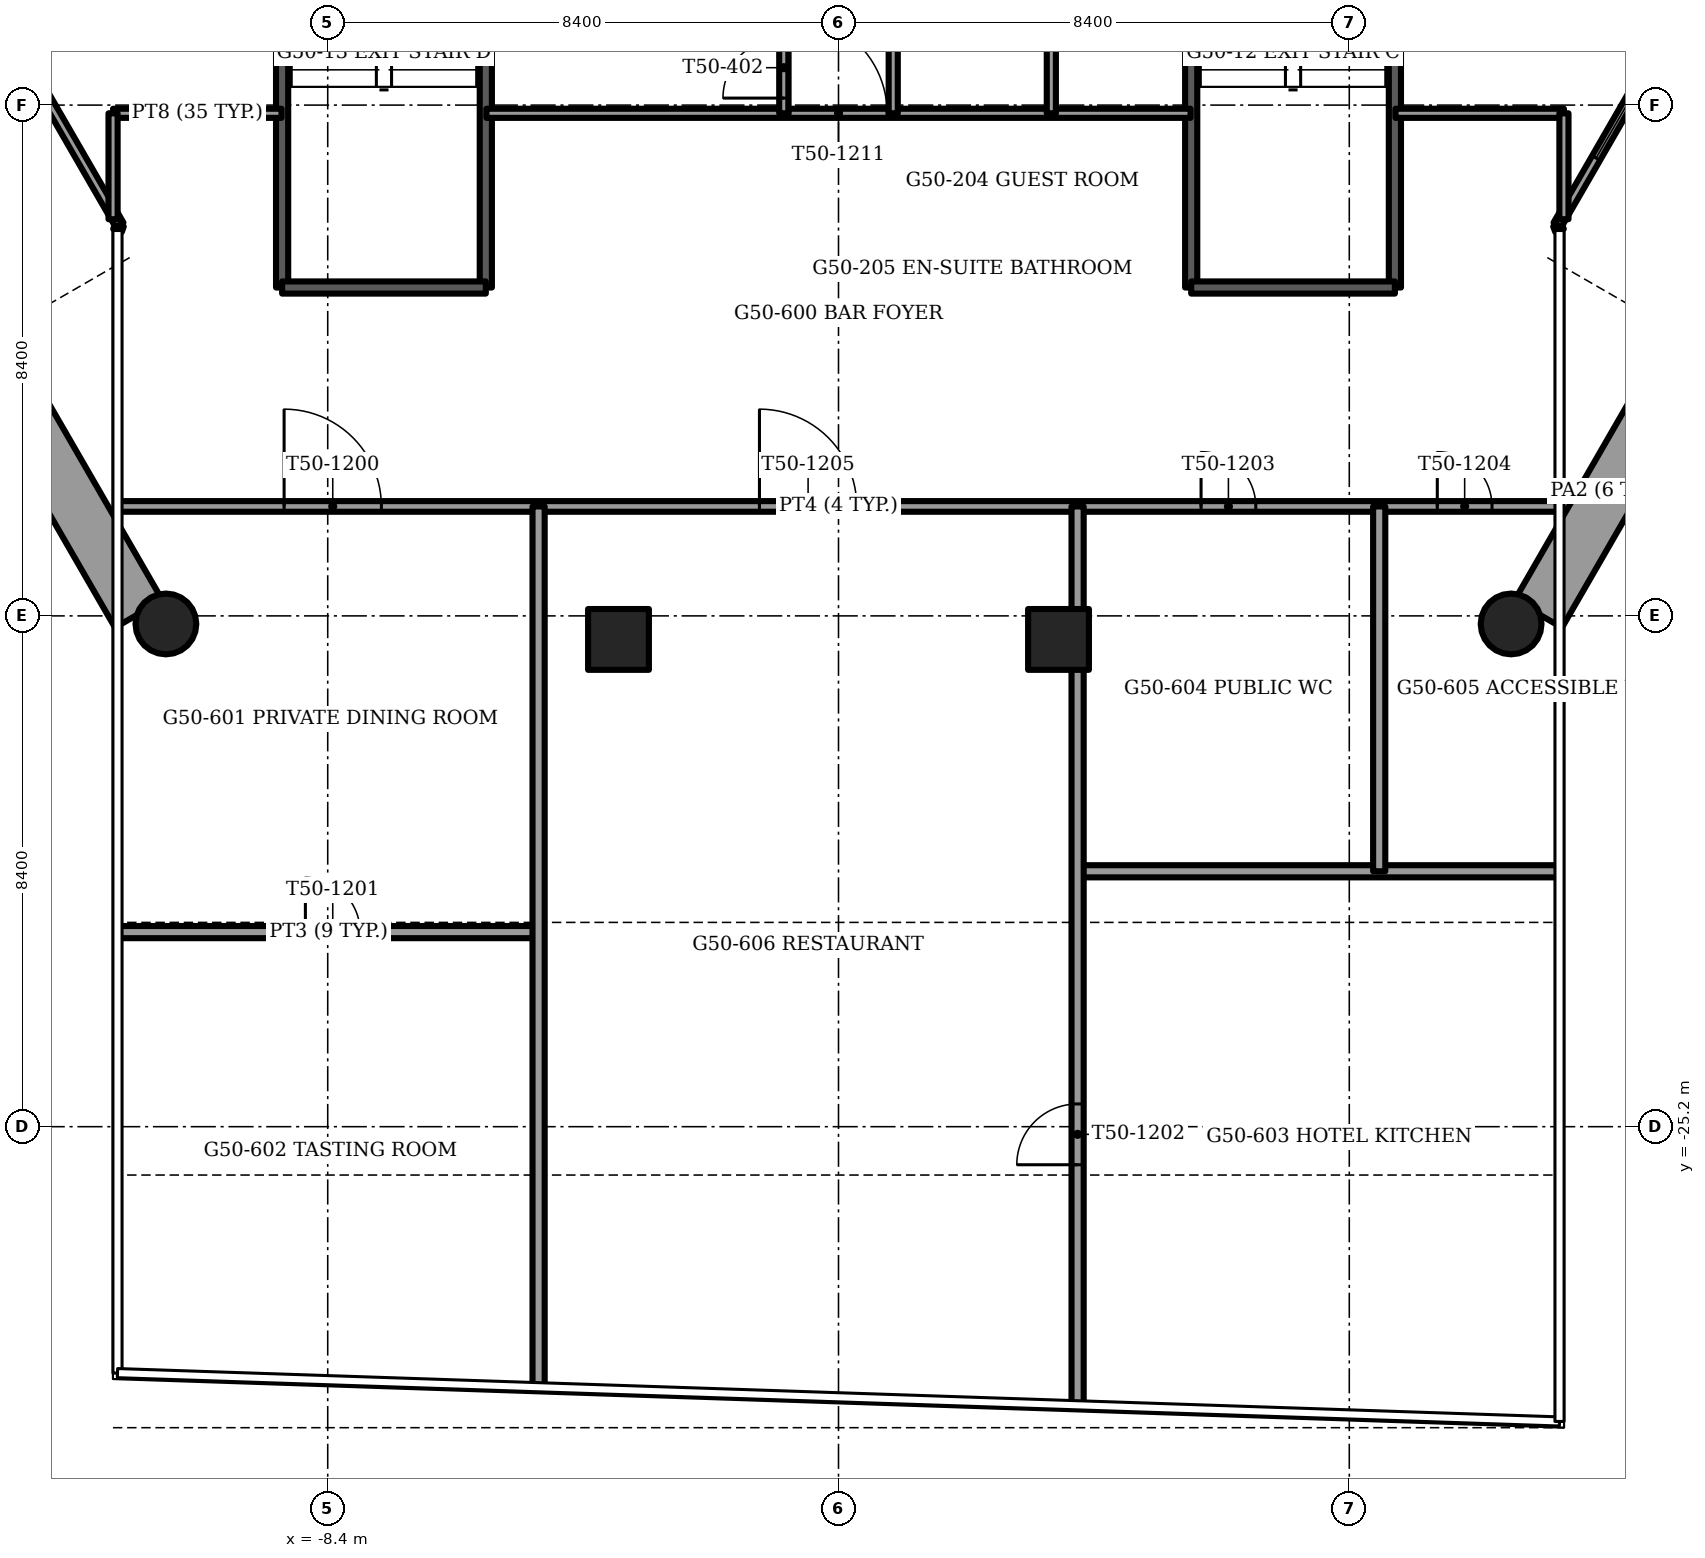
"""IFC4 building model, lengths in metres.
Left out: names, types, materials, properties, quantities, classifications, styles, units other than length and angle.
Written with IfcOpenShell. Run it as: python <this file> out.ifc"""

import sys

from ifc_helpers import new_model, si_unit, direction, frame, frame_2d, origin, origin_2d, place, context, subcontext, project, spatial, rectangle, circle, extrude, element, fill, save


model = new_model("IFC4")
c1 = context("Model", 3, precision=1e-05, world=origin(), true_north=direction((0.0, 1.0)))
c2 = subcontext(c1, "Body", "Model", "MODEL_VIEW")
j1 = project(units=[si_unit("LENGTHUNIT", "METRE"), si_unit("PLANEANGLEUNIT", "RADIAN")], contexts=[c1])
p1 = place(None, origin())
s1 = spatial("IfcSite", under=j1, at=p1, CompositionType="ELEMENT")
p2 = place(p1, origin())
s2 = spatial("IfcBuilding", under=s1, at=p2, CompositionType="ELEMENT")
p3 = place(p2, frame((0.0, 0.0, 202.0)))
s3 = spatial("IfcBuildingStorey", under=s2, at=p3, CompositionType="ELEMENT", Elevation=202.0)
for number, where, z_axis, x_axis in (
    (1, (-11.061, -16.933, -1.2), (0.0, 0.0, 1.0), (1.0, 0.0, 0.0)),
    (2, (11.061, -16.933, -1.2), (0.0, 0.0, 1.0), (1.0, 0.0, 0.0)),
):
    element("IfcColumn", number, at=place(p3, frame(where, z_axis=z_axis, x_axis=x_axis)), inside=s3, PredefinedType="COLUMN", context=c2, shape_type="SweptSolid", body=[
        extrude(circle(Radius=0.5, at=origin_2d()), origin(), (0.0, 0.0, 1.0), 3.75),
    ])
for number, where, z_axis, x_axis in (
    (3, (-3.618, -17.187, -1.2), (0.0, 0.0, 1.0), (-1.0, 0.0, 0.0)),
    (4, (3.618, -17.187, -1.2), (0.0, 0.0, 1.0), (-1.0, 0.0, 0.0)),
):
    element("IfcColumn", number, at=place(p3, frame(where, z_axis=z_axis, x_axis=x_axis)), inside=s3, PredefinedType="COLUMN", context=c2, shape_type="SweptSolid", body=[
        extrude(rectangle(XDim=1.0, YDim=1.0, at=origin_2d()), origin(), (0.0, 0.0, 1.0), 3.75),
    ])
for number, where, z_axis, x_axis in (
    (5, (-13.847, -12.715, 0.0), (0.0, 0.0, 1.0), (0.5, -0.866, 0.0)),
    (6, (11.508, -16.768, 0.0), (0.0, 0.0, 1.0), (0.5, 0.866, 0.0)),
):
    element("IfcWall", number, at=place(p3, frame(where, z_axis=z_axis, x_axis=x_axis)), inside=s3, PredefinedType="PARAPET", context=c2, shape_type="SweptSolid", body=[
        extrude(rectangle(XDim=4.679, YDim=0.9, at=frame_2d((2.339, 0.0))), origin(), (0.0, 0.0, 1.0), 1.1),
    ])
p4 = place(p3, frame((-16.861, -1.645, 0.0), z_axis=(0.0, 0.0, 1.0), x_axis=(0.499993749393, -0.866029012544, 0.0)))
e7 = element("IfcWall", 7, at=p4, inside=s3, PredefinedType="SOLIDWALL", context=c2, shape_type="SweptSolid", body=[
    extrude(rectangle(XDim=10.075, YDim=0.15, at=frame_2d((5.038, 0.0))), origin(), (0.0, 0.0, 1.0), 3.45),
])
p5 = place(p4, frame((1.006, 0.0, 0.15)))
e8 = element("IfcOpeningElement", 8, at=p5, cuts=e7, PredefinedType="OPENING", context=c2, shape_type="SweptSolid", body=[
    extrude(rectangle(XDim=0.9, YDim=2.2, at=frame_2d((0.45, 1.1))), frame((0.0, 0.075, 0.0), z_axis=(0.0, -1.0, 0.0), x_axis=(1.0, 0.0, 0.0)), (0.0, 0.0, 1.0), 0.15),
])
p6 = place(p4, frame((3.206, 0.0, 0.15)))
e9 = element("IfcOpeningElement", 9, at=p6, cuts=e7, PredefinedType="OPENING", context=c2, shape_type="SweptSolid", body=[
    extrude(rectangle(XDim=1.4, YDim=2.2, at=frame_2d((0.7, 1.1))), frame((0.0, 0.075, 0.0), z_axis=(0.0, -1.0, 0.0), x_axis=(1.0, 0.0, 0.0)), (0.0, 0.0, 1.0), 0.15),
])
p7 = place(p4, frame((5.699, 0.0, 0.15)))
e10 = element("IfcOpeningElement", 10, at=p7, cuts=e7, PredefinedType="OPENING", context=c2, shape_type="SweptSolid", body=[
    extrude(rectangle(XDim=1.6, YDim=2.2, at=frame_2d((0.8, 1.1))), frame((0.0, 0.075, 0.0), z_axis=(0.0, -1.0, 0.0), x_axis=(1.0, 0.0, 0.0)), (0.0, 0.0, 1.0), 0.15),
])
p8 = place(p3, frame((11.824, -10.37, 0.0), z_axis=(0.0, 0.0, 1.0), x_axis=(0.499993749393, 0.866029012544, 0.0)))
e11 = element("IfcWall", 11, at=p8, inside=s3, PredefinedType="SOLIDWALL", context=c2, shape_type="SweptSolid", body=[
    extrude(rectangle(XDim=10.075, YDim=0.15, at=frame_2d((5.038, 0.0))), origin(), (0.0, 0.0, 1.0), 3.45),
])
p9 = place(p8, frame((1.269, 0.0, 0.15)))
e12 = element("IfcOpeningElement", 12, at=p9, cuts=e11, PredefinedType="OPENING", context=c2, shape_type="SweptSolid", body=[
    extrude(rectangle(XDim=1.6, YDim=2.2, at=frame_2d((0.8, 1.1))), frame((0.0, 0.075, 0.0), z_axis=(0.0, -1.0, 0.0), x_axis=(1.0, 0.0, 0.0)), (0.0, 0.0, 1.0), 0.15),
])
p10 = place(p8, frame((5.469, 0.0, 0.15)))
e13 = element("IfcOpeningElement", 13, at=p10, cuts=e11, PredefinedType="OPENING", context=c2, shape_type="SweptSolid", body=[
    extrude(rectangle(XDim=1.6, YDim=2.2, at=frame_2d((0.8, 1.1))), frame((0.0, 0.075, 0.0), z_axis=(0.0, -1.0, 0.0), x_axis=(1.0, 0.0, 0.0)), (0.0, 0.0, 1.0), 0.15),
])
for number, where, z_axis, x_axis in (
    (14, (-11.824, -10.37, 0.0), (0.0, 0.0, 1.0), (-0.339, -0.941, 0.0)),
    (15, (11.824, -10.37, 0.0), (0.0, 0.0, 1.0), (0.339, -0.941, 0.0)),
):
    element("IfcWall", number, at=place(p3, frame(where, z_axis=z_axis, x_axis=x_axis)), inside=s3, PredefinedType="SOLIDWALL", context=c2, shape_type="SweptSolid", body=[
        extrude(rectangle(XDim=0.098, YDim=0.15, at=frame_2d((0.049, 0.0))), origin(), (0.0, 0.0, 1.0), 3.45),
    ])
for number, where, z_axis, x_axis in (
    (16, (5.8, -3.7, -0.3), (0.0, 0.0, 1.0), (0.0, -1.0, 0.0)),
    (17, (9.15, -3.7, -0.3), (0.0, 0.0, 1.0), (0.0, -1.0, 0.0)),
):
    element("IfcWall", number, at=place(p3, frame(where, z_axis=z_axis, x_axis=x_axis)), inside=s3, PredefinedType="SOLIDWALL", context=c2, shape_type="SweptSolid", body=[
        extrude(rectangle(XDim=7.7, YDim=0.2, at=frame_2d((3.85, 0.0))), origin(), (0.0, 0.0, 1.0), 3.75),
    ])
p11 = place(p3, frame((5.8, -11.4, -0.3), z_axis=(0.0, 0.0, 1.0), x_axis=(1.0, 0.0, 0.0)))
e18 = element("IfcWall", 18, at=p11, inside=s3, PredefinedType="SOLIDWALL", context=c2, shape_type="SweptSolid", body=[
    extrude(rectangle(XDim=3.35, YDim=0.2, at=frame_2d((1.675, 0.0))), origin(), (0.0, 0.0, 1.0), 3.75),
])
for number, where, z_axis, x_axis in (
    (19, (-9.15, -3.7, -0.3), (0.0, 0.0, 1.0), (0.0, -1.0, 0.0)),
    (20, (-5.8, -3.7, -0.3), (0.0, 0.0, 1.0), (0.0, -1.0, 0.0)),
):
    element("IfcWall", number, at=place(p3, frame(where, z_axis=z_axis, x_axis=x_axis)), inside=s3, PredefinedType="SOLIDWALL", context=c2, shape_type="SweptSolid", body=[
        extrude(rectangle(XDim=7.7, YDim=0.2, at=frame_2d((3.85, 0.0))), origin(), (0.0, 0.0, 1.0), 3.75),
    ])
p12 = place(p3, frame((-9.15, -11.4, -0.3), z_axis=(0.0, 0.0, 1.0), x_axis=(1.0, 0.0, 0.0)))
e21 = element("IfcWall", 21, at=p12, inside=s3, PredefinedType="SOLIDWALL", context=c2, shape_type="SweptSolid", body=[
    extrude(rectangle(XDim=3.35, YDim=0.2, at=frame_2d((1.675, 0.0))), origin(), (0.0, 0.0, 1.0), 3.75),
])
p13 = place(p3, frame((-11.93, -8.535, 0.0), z_axis=(0.0, 0.0, 1.0), x_axis=(1.0, 0.0, 0.0)))
e22 = element("IfcWall", 22, at=p13, inside=s3, PredefinedType="PARTITIONING", context=c2, shape_type="SweptSolid", body=[
    extrude(rectangle(XDim=2.77, YDim=0.15, at=frame_2d((1.385, 0.0))), origin(), (0.0, 0.0, 1.0), 3.45),
])
p14 = place(p3, frame((-5.79, -8.535, 0.0), z_axis=(0.0, 0.0, 1.0), x_axis=(1.0, 0.0, 0.0)))
e23 = element("IfcWall", 23, at=p14, inside=s3, PredefinedType="PARTITIONING", context=c2, shape_type="SweptSolid", body=[
    extrude(rectangle(XDim=11.58, YDim=0.15, at=frame_2d((5.79, 0.0))), origin(), (0.0, 0.0, 1.0), 3.45),
])
p15 = place(p14, frame((4.99, 0.0, 0.0)))
e24 = element("IfcOpeningElement", 24, at=p15, cuts=e23, PredefinedType="OPENING", context=c2, shape_type="SweptSolid", body=[
    extrude(rectangle(XDim=1.6, YDim=2.1, at=frame_2d((0.8, 1.05))), frame((0.0, 0.075, 0.0), z_axis=(0.0, -1.0, 0.0), x_axis=(1.0, 0.0, 0.0)), (0.0, 0.0, 1.0), 0.15),
])
p16 = place(p3, frame((9.16, -8.535, 0.0), z_axis=(0.0, 0.0, 1.0), x_axis=(1.0, 0.0, 0.0)))
e25 = element("IfcWall", 25, at=p16, inside=s3, PredefinedType="PARTITIONING", context=c2, shape_type="SweptSolid", body=[
    extrude(rectangle(XDim=2.77, YDim=0.15, at=frame_2d((1.385, 0.0))), origin(), (0.0, 0.0, 1.0), 3.45),
])
p17 = place(p3, frame((11.93, -10.277, 0.0), z_axis=(0.0, 0.0, 1.0), x_axis=(0.0, 1.0, 0.0)))
e26 = element("IfcWall", 26, at=p17, inside=s3, PredefinedType="PARTITIONING", context=c2, shape_type="SweptSolid", body=[
    extrude(rectangle(XDim=1.742, YDim=0.15, at=frame_2d((0.871, 0.0))), origin(), (0.0, 0.0, 1.0), 3.45),
])
p18 = place(p3, frame((3.5, -8.535, 0.0), z_axis=(0.0, 0.0, 1.0), x_axis=(0.0, 1.0, 0.0)))
e27 = element("IfcWall", 27, at=p18, inside=s3, PredefinedType="PARTITIONING", context=c2, shape_type="SweptSolid", body=[
    extrude(rectangle(XDim=3.39, YDim=0.15, at=frame_2d((1.695, 0.0))), origin(), (0.0, 0.0, 1.0), 3.45),
])
p19 = place(p3, frame((0.9, -8.535, 0.0), z_axis=(0.0, 0.0, 1.0), x_axis=(0.0, 1.0, 0.0)))
e28 = element("IfcWall", 28, at=p19, inside=s3, PredefinedType="PARTITIONING", context=c2, shape_type="SweptSolid", body=[
    extrude(rectangle(XDim=4.835, YDim=0.15, at=frame_2d((2.417, 0.0))), origin(), (0.0, 0.0, 1.0), 3.45),
])
p20 = place(p19, frame((3.585, 0.0, 0.0)))
e29 = element("IfcOpeningElement", 29, at=p20, cuts=e28, PredefinedType="OPENING", context=c2, shape_type="SweptSolid", body=[
    extrude(rectangle(XDim=1.0, YDim=2.1, at=frame_2d((0.5, 1.05))), frame((0.0, 0.075, 0.0), z_axis=(0.0, -1.0, 0.0), x_axis=(1.0, 0.0, 0.0)), (0.0, 0.0, 1.0), 0.15),
])
p21 = place(p3, frame((-0.9, -8.535, 0.0), z_axis=(0.0, 0.0, 1.0), x_axis=(0.0, 1.0, 0.0)))
e30 = element("IfcWall", 30, at=p21, inside=s3, PredefinedType="PARTITIONING", context=c2, shape_type="SweptSolid", body=[
    extrude(rectangle(XDim=4.835, YDim=0.15, at=frame_2d((2.417, 0.0))), origin(), (0.0, 0.0, 1.0), 3.45),
])
p22 = place(p21, frame((0.25, 0.0, 0.0)))
e31 = element("IfcOpeningElement", 31, at=p22, cuts=e30, PredefinedType="OPENING", context=c2, shape_type="SweptSolid", body=[
    extrude(rectangle(XDim=1.0, YDim=2.1, at=frame_2d((0.5, 1.05))), frame((0.0, 0.075, 0.0), z_axis=(0.0, -1.0, 0.0), x_axis=(1.0, 0.0, 0.0)), (0.0, 0.0, 1.0), 0.15),
])
p23 = place(p3, frame((-11.93, -10.277, 0.0), z_axis=(0.0, 0.0, 1.0), x_axis=(0.0, 1.0, 0.0)))
e32 = element("IfcWall", 32, at=p23, inside=s3, PredefinedType="PARTITIONING", context=c2, shape_type="SweptSolid", body=[
    extrude(rectangle(XDim=1.742, YDim=0.15, at=frame_2d((0.871, 0.0))), origin(), (0.0, 0.0, 1.0), 3.45),
])
p24 = place(p3, frame((-11.838, -15.0, 0.0), z_axis=(0.0, 0.0, 1.0), x_axis=(1.0, 0.0, 0.0)))
e33 = element("IfcWall", 33, at=p24, inside=s3, PredefinedType="PARTITIONING", context=c2, shape_type="SweptSolid", body=[
    extrude(rectangle(XDim=23.676, YDim=0.175, at=frame_2d((11.838, 0.0))), origin(), (0.0, 0.0, 1.0), 3.45),
])
p25 = place(p24, frame((2.721, 0.0, 0.0)))
e34 = element("IfcOpeningElement", 34, at=p25, cuts=e33, PredefinedType="OPENING", context=c2, shape_type="SweptSolid", body=[
    extrude(rectangle(XDim=1.6, YDim=2.1, at=frame_2d((0.8, 1.05))), frame((0.0, 0.087, 0.0), z_axis=(0.0, -1.0, 0.0), x_axis=(1.0, 0.0, 0.0)), (0.0, 0.0, 1.0), 0.175),
])
p26 = place(p24, frame((17.8, 0.0, 0.0)))
e35 = element("IfcOpeningElement", 35, at=p26, cuts=e33, PredefinedType="OPENING", context=c2, shape_type="SweptSolid", body=[
    extrude(rectangle(XDim=0.9, YDim=2.1, at=frame_2d((0.45, 1.05))), frame((0.0, 0.087, 0.0), z_axis=(0.0, -1.0, 0.0), x_axis=(1.0, 0.0, 0.0)), (0.0, 0.0, 1.0), 0.175),
])
p27 = place(p24, frame((21.685, 0.0, 0.0)))
e36 = element("IfcOpeningElement", 36, at=p27, cuts=e33, PredefinedType="OPENING", context=c2, shape_type="SweptSolid", body=[
    extrude(rectangle(XDim=0.9, YDim=2.1, at=frame_2d((0.45, 1.05))), frame((0.0, 0.087, 0.0), z_axis=(0.0, -1.0, 0.0), x_axis=(1.0, 0.0, 0.0)), (0.0, 0.0, 1.0), 0.175),
])
p28 = place(p24, frame((10.538, 0.0, 0.0)))
e37 = element("IfcOpeningElement", 37, at=p28, cuts=e33, PredefinedType="OPENING", context=c2, shape_type="SweptSolid", body=[
    extrude(rectangle(XDim=1.6, YDim=2.1, at=frame_2d((0.8, 1.05))), frame((0.0, 0.087, 0.0), z_axis=(0.0, -1.0, 0.0), x_axis=(1.0, 0.0, 0.0)), (0.0, 0.0, 1.0), 0.175),
])
p29 = place(p3, frame((-11.838, -22.0, 0.0), z_axis=(0.0, 0.0, 1.0), x_axis=(1.0, 0.0, 0.0)))
e38 = element("IfcWall", 38, at=p29, inside=s3, PredefinedType="PARTITIONING", context=c2, shape_type="SweptSolid", body=[
    extrude(rectangle(XDim=6.906, YDim=0.2, at=frame_2d((3.453, 0.0))), origin(), (0.0, 0.0, 1.0), 2.839),
])
p30 = place(p29, frame((3.071, 0.0, 0.0)))
e39 = element("IfcOpeningElement", 39, at=p30, cuts=e38, PredefinedType="OPENING", context=c2, shape_type="SweptSolid", body=[
    extrude(rectangle(XDim=0.9, YDim=2.1, at=frame_2d((0.45, 1.05))), frame((0.0, 0.1, 0.0), z_axis=(0.0, -1.0, 0.0), x_axis=(1.0, 0.0, 0.0)), (0.0, 0.0, 1.0), 0.2),
])
p31 = place(p3, frame((3.932, -21.0, 0.0), z_axis=(0.0, 0.0, 1.0), x_axis=(1.0, 0.0, 0.0)))
e40 = element("IfcWall", 40, at=p31, inside=s3, PredefinedType="PARTITIONING", context=c2, shape_type="SweptSolid", body=[
    extrude(rectangle(XDim=7.906, YDim=0.2, at=frame_2d((3.953, 0.0))), origin(), (0.0, 0.0, 1.0), 3.45),
])
p32 = place(p3, frame((-4.932, -29.466, 0.0), z_axis=(0.0, 0.0, 1.0), x_axis=(0.0, 1.0, 0.0)))
e41 = element("IfcWall", 41, at=p32, inside=s3, PredefinedType="PARTITIONING", context=c2, shape_type="SweptSolid", body=[
    extrude(rectangle(XDim=14.466, YDim=0.2, at=frame_2d((7.233, 0.0))), origin(), (0.0, 0.0, 1.0), 2.839),
])
p33 = place(p3, frame((3.932, -29.763, 0.0), z_axis=(0.0, 0.0, 1.0), x_axis=(0.0, 1.0, 0.0)))
e42 = element("IfcWall", 42, at=p33, inside=s3, PredefinedType="PARTITIONING", context=c2, shape_type="SweptSolid", body=[
    extrude(rectangle(XDim=14.763, YDim=0.2, at=frame_2d((7.381, 0.0))), origin(), (0.0, 0.0, 1.0), 2.839),
])
p34 = place(p33, frame((3.937, 0.0, 0.0)))
e43 = element("IfcOpeningElement", 43, at=p34, cuts=e42, PredefinedType="OPENING", context=c2, shape_type="SweptSolid", body=[
    extrude(rectangle(XDim=1.0, YDim=2.1, at=frame_2d((0.5, 1.05))), frame((0.0, 0.1, 0.0), z_axis=(0.0, -1.0, 0.0), x_axis=(1.0, 0.0, 0.0)), (0.0, 0.0, 1.0), 0.2),
])
p35 = place(p3, frame((8.892, -21.0, 0.0), z_axis=(0.0, 0.0, 1.0), x_axis=(0.0, 1.0, 0.0)))
e44 = element("IfcWall", 44, at=p35, inside=s3, PredefinedType="PARTITIONING", context=c2, shape_type="SweptSolid", body=[
    extrude(rectangle(XDim=6.0, YDim=0.2, at=frame_2d((3.0, 0.0))), origin(), (0.0, 0.0, 1.0), 3.45),
])
p36 = place(p9, origin())
e45 = element("IfcWindow", 45, at=p36, inside=s3, PartitioningType="SINGLE_PANEL", PredefinedType="WINDOW", context=c2, shape_type="SweptSolid", body=[
    extrude(rectangle(XDim=1.6, YDim=2.2, at=frame_2d((0.8, 1.1))), frame((0.0, 0.03, 0.0), z_axis=(0.0, -1.0, 0.0), x_axis=(1.0, 0.0, 0.0)), (0.0, 0.0, 1.0), 0.06),
])
fill(e12, e45)
p37 = place(p22, origin())
e46 = element("IfcDoor", 46, at=p37, inside=s3, OperationType="SINGLE_SWING_LEFT", PredefinedType="DOOR", context=c2, shape_type="SweptSolid", body=[
    extrude(rectangle(XDim=1.0, YDim=2.1, at=frame_2d((0.5, 1.05))), frame((0.0, 0.025, 0.0), z_axis=(0.0, -1.0, 0.0), x_axis=(1.0, 0.0, 0.0)), (0.0, 0.0, 1.0), 0.05),
])
fill(e31, e46)
p38 = place(p25, origin())
e47 = element("IfcDoor", 47, at=p38, inside=s3, OperationType="DOUBLE_DOOR_SINGLE_SWING", PredefinedType="DOOR", context=c2, shape_type="SweptSolid", body=[
    extrude(rectangle(XDim=1.6, YDim=2.1, at=frame_2d((0.8, 1.05))), frame((0.0, 0.025, 0.0), z_axis=(0.0, -1.0, 0.0), x_axis=(1.0, 0.0, 0.0)), (0.0, 0.0, 1.0), 0.05),
])
fill(e34, e47)
p39 = place(p30, origin())
e48 = element("IfcDoor", 48, at=p39, inside=s3, OperationType="SINGLE_SWING_LEFT", PredefinedType="DOOR", context=c2, shape_type="SweptSolid", body=[
    extrude(rectangle(XDim=0.9, YDim=2.1, at=frame_2d((0.45, 1.05))), frame((0.0, 0.025, 0.0), z_axis=(0.0, -1.0, 0.0), x_axis=(1.0, 0.0, 0.0)), (0.0, 0.0, 1.0), 0.05),
])
fill(e39, e48)
p40 = place(p34, origin())
e49 = element("IfcDoor", 49, at=p40, inside=s3, OperationType="SINGLE_SWING_RIGHT", PredefinedType="DOOR", context=c2, shape_type="SweptSolid", body=[
    extrude(rectangle(XDim=1.0, YDim=2.1, at=frame_2d((0.5, 1.05))), frame((0.0, 0.025, 0.0), z_axis=(0.0, -1.0, 0.0), x_axis=(1.0, 0.0, 0.0)), (0.0, 0.0, 1.0), 0.05),
])
fill(e43, e49)
p41 = place(p26, origin())
e50 = element("IfcDoor", 50, at=p41, inside=s3, OperationType="SINGLE_SWING_LEFT", PredefinedType="DOOR", context=c2, shape_type="SweptSolid", body=[
    extrude(rectangle(XDim=0.9, YDim=2.1, at=frame_2d((0.45, 1.05))), frame((0.0, 0.025, 0.0), z_axis=(0.0, -1.0, 0.0), x_axis=(1.0, 0.0, 0.0)), (0.0, 0.0, 1.0), 0.05),
])
fill(e35, e50)
p42 = place(p27, origin())
e51 = element("IfcDoor", 51, at=p42, inside=s3, OperationType="SINGLE_SWING_RIGHT", PredefinedType="DOOR", context=c2, shape_type="SweptSolid", body=[
    extrude(rectangle(XDim=0.9, YDim=2.1, at=frame_2d((0.45, 1.05))), frame((0.0, 0.025, 0.0), z_axis=(0.0, -1.0, 0.0), x_axis=(1.0, 0.0, 0.0)), (0.0, 0.0, 1.0), 0.05),
])
fill(e36, e51)
p43 = place(p28, origin())
e52 = element("IfcDoor", 52, at=p43, inside=s3, OperationType="DOUBLE_DOOR_SINGLE_SWING", PredefinedType="DOOR", context=c2, shape_type="SweptSolid", body=[
    extrude(rectangle(XDim=1.6, YDim=2.1, at=frame_2d((0.8, 1.05))), frame((0.0, 0.025, 0.0), z_axis=(0.0, -1.0, 0.0), x_axis=(1.0, 0.0, 0.0)), (0.0, 0.0, 1.0), 0.05),
])
fill(e37, e52)
p44 = place(p15, origin())
e53 = element("IfcDoor", 53, at=p44, inside=s3, OperationType="DOUBLE_DOOR_SINGLE_SWING", PredefinedType="DOOR", context=c2, shape_type="SweptSolid", body=[
    extrude(rectangle(XDim=1.6, YDim=2.1, at=frame_2d((0.8, 1.05))), frame((0.0, 0.025, 0.0), z_axis=(0.0, -1.0, 0.0), x_axis=(1.0, 0.0, 0.0)), (0.0, 0.0, 1.0), 0.05),
])
fill(e24, e53)
save(model, sys.argv[1])
